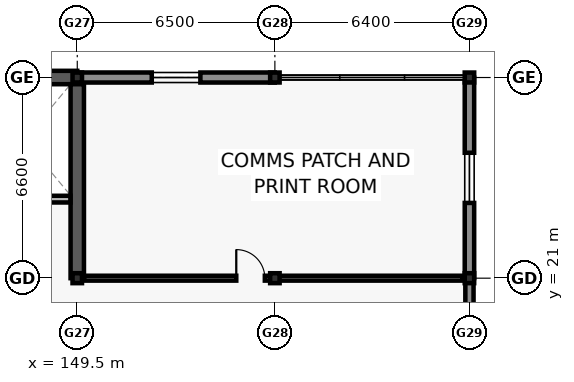
"""IFC4 building model, lengths in metres.
Left out: names, types, materials, properties, quantities, classifications, styles, units other than length and angle.
Written with IfcOpenShell. Run it as: python <this file> out.ifc"""

import sys

from ifc_helpers import new_model, si_unit, direction, frame, frame_2d, origin, origin_2d, place, context, subcontext, project, spatial, rectangle, i_section, extrude, element, fill, save


model = new_model("IFC4")
c1 = context("Model", 3, precision=1e-05, world=origin(), true_north=direction((0.0, 1.0)))
c2 = subcontext(c1, "Body", "Model", "MODEL_VIEW")
j1 = project(units=[si_unit("LENGTHUNIT", "METRE"), si_unit("PLANEANGLEUNIT", "RADIAN")], contexts=[c1])
p1 = place(None, origin())
s1 = spatial("IfcSite", under=j1, at=p1, CompositionType="ELEMENT")
p2 = place(p1, origin())
s2 = spatial("IfcBuilding", under=s1, at=p2, CompositionType="ELEMENT")
p3 = place(p2, frame((0.0, 0.0, 5.4)))
s3 = spatial("IfcBuildingStorey", under=s2, at=p3, CompositionType="ELEMENT", Elevation=5.4)
for number, where, z_axis, x_axis in (
    (1, (149.5, 21.0, 0.0), (0.0, 0.0, 1.0), (1.0, 0.0, 0.0)),
    (2, (149.5, 27.6, 0.0), (0.0, 0.0, 1.0), (1.0, 0.0, 0.0)),
    (3, (156.0, 21.0, 0.0), (0.0, 0.0, 1.0), (1.0, 0.0, 0.0)),
    (4, (156.0, 27.6, 0.0), (0.0, 0.0, 1.0), (1.0, 0.0, 0.0)),
    (5, (162.4, 21.0, 0.0), (0.0, 0.0, 1.0), (1.0, 0.0, 0.0)),
    (6, (162.4, 27.6, 0.0), (0.0, 0.0, 1.0), (1.0, 0.0, 0.0)),
):
    element("IfcColumn", number, at=place(p3, frame(where, z_axis=z_axis, x_axis=x_axis)), inside=s3, PredefinedType="COLUMN", context=c2, shape_type="SweptSolid", body=[
        extrude(i_section(OverallWidth=0.311, OverallDepth=0.327, WebThickness=0.016, FlangeThickness=0.025, FilletRadius=0.017, at=origin_2d()), origin(), (0.0, 0.0, 1.0), 4.2),
    ])
p4 = place(p3, frame((143.0, 27.6, 0.0), z_axis=(0.0, 0.0, 1.0), x_axis=(1.0, 0.0, 0.0)))
e7 = element("IfcWall", 7, at=p4, inside=s3, PredefinedType="SHEAR", context=c2, shape_type="SweptSolid", body=[
    extrude(rectangle(XDim=6.5, YDim=0.44, at=frame_2d((3.25, 0.0))), origin(), (0.0, 0.0, 1.0), 3.96),
])
p5 = place(p3, frame((149.5, 21.0, 0.0), z_axis=(0.0, 0.0, 1.0), x_axis=(0.0, 1.0, 0.0)))
e8 = element("IfcWall", 8, at=p5, inside=s3, PredefinedType="SHEAR", context=c2, shape_type="SweptSolid", body=[
    extrude(rectangle(XDim=6.38, YDim=0.44, at=frame_2d((3.19, 0.0))), origin(), (0.0, 0.0, 1.0), 3.96),
])
p6 = place(p3, frame((149.505, 27.6, 0.0), z_axis=(0.0, 0.0, 1.0), x_axis=(1.0, 0.0, 0.0)))
e9 = element("IfcWall", 9, at=p6, inside=s3, PredefinedType="SOLIDWALL", context=c2, shape_type="SweptSolid", body=[
    extrude(rectangle(XDim=6.49, YDim=0.33, at=frame_2d((3.245, 0.0))), origin(), (0.0, 0.0, 1.0), 3.32),
])
p7 = place(p6, frame((2.445, 0.0, 0.8)))
e10 = element("IfcOpeningElement", 10, at=p7, cuts=e9, PredefinedType="OPENING", context=c2, shape_type="SweptSolid", body=[
    extrude(rectangle(XDim=1.6, YDim=1.8, at=frame_2d((0.8, 0.9))), frame((0.0, 0.175, 0.0), z_axis=(0.0, -1.0, 0.0), x_axis=(1.0, 0.0, 0.0)), (0.0, 0.0, 1.0), 0.35),
])
p8 = place(p3, frame((162.4, 20.995, 0.0), z_axis=(0.0, 0.0, 1.0), x_axis=(0.0, -1.0, 0.0)))
e11 = element("IfcWall", 11, at=p8, inside=s3, PredefinedType="SOLIDWALL", context=c2, shape_type="SweptSolid", body=[
    extrude(rectangle(XDim=6.59, YDim=0.27, at=frame_2d((3.295, 0.0))), origin(), (0.0, 0.0, 1.0), 3.32),
])
p9 = place(p8, frame((4.002, 0.0, 0.8)))
e12 = element("IfcOpeningElement", 12, at=p9, cuts=e11, PredefinedType="OPENING", context=c2, shape_type="SweptSolid", body=[
    extrude(rectangle(XDim=1.35, YDim=2.05, at=frame_2d((0.675, 1.025))), frame((0.0, 0.145, 0.0), z_axis=(0.0, -1.0, 0.0), x_axis=(1.0, 0.0, 0.0)), (0.0, 0.0, 1.0), 0.29),
])
p10 = place(p3, frame((162.4, 27.595, 0.0), z_axis=(0.0, 0.0, 1.0), x_axis=(0.0, -1.0, 0.0)))
e13 = element("IfcWall", 13, at=p10, inside=s3, PredefinedType="SOLIDWALL", context=c2, shape_type="SweptSolid", body=[
    extrude(rectangle(XDim=6.59, YDim=0.31, at=frame_2d((3.295, 0.0))), origin(), (0.0, 0.0, 1.0), 3.32),
])
p11 = place(p10, frame((2.47, 0.0, 0.8)))
e14 = element("IfcOpeningElement", 14, at=p11, cuts=e13, PredefinedType="OPENING", context=c2, shape_type="SweptSolid", body=[
    extrude(rectangle(XDim=1.65, YDim=2.05, at=frame_2d((0.825, 1.025))), frame((0.0, 0.165, 0.0), z_axis=(0.0, -1.0, 0.0), x_axis=(1.0, 0.0, 0.0)), (0.0, 0.0, 1.0), 0.33),
])
p12 = place(p3, frame((146.24, 23.6, 0.0), z_axis=(0.0, 0.0, 1.0), x_axis=(1.0, 0.0, 0.0)))
e15 = element("IfcWall", 15, at=p12, inside=s3, PredefinedType="SOLIDWALL", context=c2, shape_type="SweptSolid", body=[
    extrude(rectangle(XDim=3.035, YDim=0.22, at=frame_2d((1.518, 0.0))), origin(), (0.0, 0.0, 1.0), 3.96),
])
p13 = place(p12, frame((0.968, 0.0, 0.0)))
e16 = element("IfcOpeningElement", 16, at=p13, cuts=e15, PredefinedType="OPENING", context=c2, shape_type="SweptSolid", body=[
    extrude(rectangle(XDim=1.1, YDim=2.1, at=frame_2d((0.55, 1.05))), frame((0.0, 0.12, 0.0), z_axis=(0.0, -1.0, 0.0), x_axis=(1.0, 0.0, 0.0)), (0.0, 0.0, 1.0), 0.24),
])
p14 = place(p3, frame((149.72, 21.0, 0.0), z_axis=(0.0, 0.0, 1.0), x_axis=(1.0, 0.0, 0.0)))
e17 = element("IfcWall", 17, at=p14, inside=s3, PredefinedType="PARTITIONING", context=c2, shape_type="SweptSolid", body=[
    extrude(rectangle(XDim=12.46, YDim=0.16, at=frame_2d((6.23, 0.0))), origin(), (0.0, 0.0, 1.0), 3.3),
])
p15 = place(p14, frame((5.01, 0.0, 0.0)))
e18 = element("IfcOpeningElement", 18, at=p15, cuts=e17, PredefinedType="OPENING", context=c2, shape_type="SweptSolid", body=[
    extrude(rectangle(XDim=0.94, YDim=2.08, at=frame_2d((0.47, 1.04))), frame((0.0, 0.09, 0.0), z_axis=(0.0, -1.0, 0.0), x_axis=(1.0, 0.0, 0.0)), (0.0, 0.0, 1.0), 0.18),
])
p16 = place(p7, origin())
e19 = element("IfcWindow", 19, at=p16, inside=s3, PartitioningType="DOUBLE_PANEL_VERTICAL", PredefinedType="WINDOW", context=c2, shape_type="SweptSolid", body=[
    extrude(rectangle(XDim=1.6, YDim=1.8, at=frame_2d((0.8, 0.9))), frame((0.0, 0.03, 0.0), z_axis=(0.0, -1.0, 0.0), x_axis=(1.0, 0.0, 0.0)), (0.0, 0.0, 1.0), 0.06),
])
fill(e10, e19)
p17 = place(p11, origin())
e20 = element("IfcWindow", 20, at=p17, inside=s3, PartitioningType="DOUBLE_PANEL_VERTICAL", PredefinedType="WINDOW", context=c2, shape_type="SweptSolid", body=[
    extrude(rectangle(XDim=1.65, YDim=2.05, at=frame_2d((0.825, 1.025))), frame((0.0, 0.03, 0.0), z_axis=(0.0, -1.0, 0.0), x_axis=(1.0, 0.0, 0.0)), (0.0, 0.0, 1.0), 0.06),
])
fill(e14, e20)
p18 = place(p15, origin())
e21 = element("IfcDoor", 21, at=p18, inside=s3, OperationType="SINGLE_SWING_LEFT", PredefinedType="DOOR", context=c2, shape_type="SweptSolid", body=[
    extrude(rectangle(XDim=0.94, YDim=2.08, at=frame_2d((0.47, 1.04))), frame((0.0, 0.025, 0.0), z_axis=(0.0, -1.0, 0.0), x_axis=(1.0, 0.0, 0.0)), (0.0, 0.0, 1.0), 0.05),
])
fill(e18, e21)
save(model, sys.argv[1])
